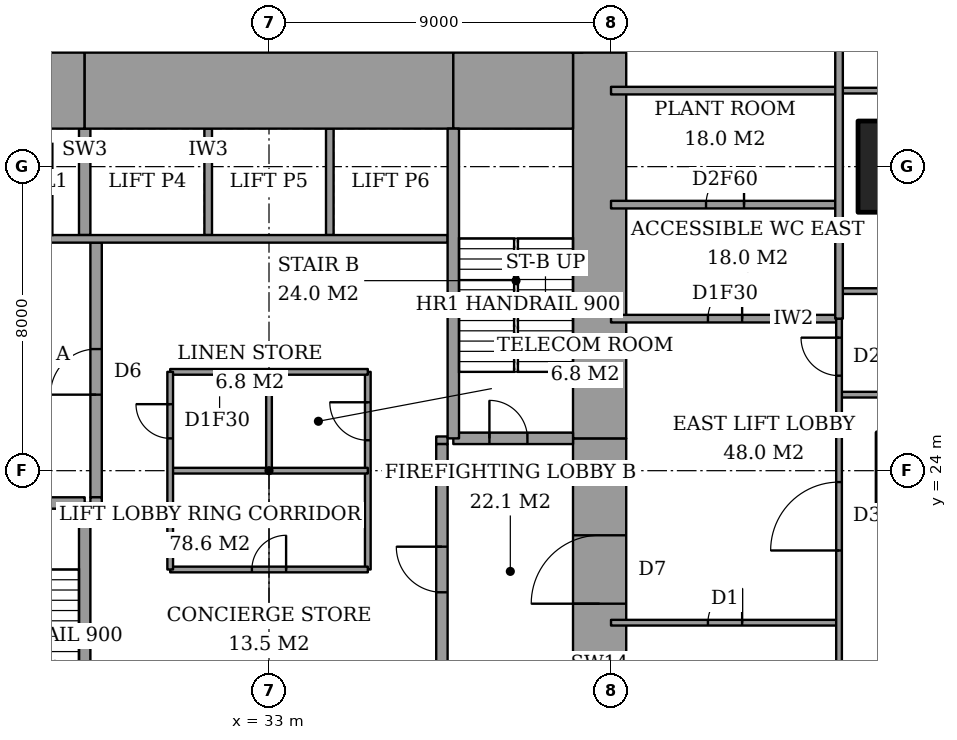
"""IFC4 building model, lengths in metres.
Left out: names, types, materials, properties, quantities, classifications, styles, units other than length and angle.
Written with IfcOpenShell. Run it as: python <this file> out.ifc"""

import sys

from ifc_helpers import new_model, si_unit, direction, frame, frame_2d, origin, origin_2d, place, context, subcontext, project, spatial, rectangle, extrude, element, fill, save


model = new_model("IFC4")
c1 = context("Model", 3, precision=1e-05, world=origin(), true_north=direction((0.0, 1.0)))
c2 = subcontext(c1, "Body", "Model", "MODEL_VIEW")
j1 = project(units=[si_unit("LENGTHUNIT", "METRE"), si_unit("PLANEANGLEUNIT", "RADIAN")], contexts=[c1])
p1 = place(None, origin())
s1 = spatial("IfcSite", under=j1, at=p1, CompositionType="ELEMENT")
p2 = place(p1, origin())
s2 = spatial("IfcBuilding", under=s1, at=p2, CompositionType="ELEMENT")
p3 = place(p2, frame((0.0, 0.0, 16.0)))
s3 = spatial("IfcBuildingStorey", under=s2, at=p3, CompositionType="ELEMENT", Elevation=16.0)
p4 = place(p3, frame((50.0, 32.0, 0.0), z_axis=(0.0, 0.0, 1.0), x_axis=(1.0, 0.0, 0.0)))
e1 = element("IfcColumn", 1, at=p4, inside=s3, PredefinedType="COLUMN", context=c2, shape_type="SweptSolid", body=[
    extrude(rectangle(XDim=3.0, YDim=2.4, at=origin_2d()), origin(), (0.0, 0.0, 1.0), 5.0),
])
p5 = place(p3, frame((25.0, 34.0, 0.0), z_axis=(0.0, 0.0, 1.0), x_axis=(1.0, 0.0, 0.0)))
e2 = element("IfcWall", 2, at=p5, inside=s3, PredefinedType="SHEAR", context=c2, shape_type="SweptSolid", body=[
    extrude(rectangle(XDim=3.15, YDim=2.0, at=frame_2d((1.575, 0.0))), origin(), (0.0, 0.0, 1.0), 5.0),
])
p6 = place(p3, frame((28.15, 34.0, 0.0), z_axis=(0.0, 0.0, 1.0), x_axis=(1.0, 0.0, 0.0)))
e3 = element("IfcWall", 3, at=p6, inside=s3, PredefinedType="SHEAR", context=c2, shape_type="SweptSolid", body=[
    extrude(rectangle(XDim=9.7, YDim=2.0, at=frame_2d((4.85, 0.0))), origin(), (0.0, 0.0, 1.0), 5.0),
])
p7 = place(p3, frame((37.85, 34.0, 0.0), z_axis=(0.0, 0.0, 1.0), x_axis=(1.0, 0.0, 0.0)))
e4 = element("IfcWall", 4, at=p7, inside=s3, PredefinedType="SHEAR", context=c2, shape_type="SweptSolid", body=[
    extrude(rectangle(XDim=3.15, YDim=2.0, at=frame_2d((1.575, 0.0))), origin(), (0.0, 0.0, 1.0), 5.0),
])
p8 = place(p3, frame((41.7, 13.0, 0.0), z_axis=(0.0, 0.0, 1.0), x_axis=(0.0, 1.0, 0.0)))
e5 = element("IfcWall", 5, at=p8, inside=s3, PredefinedType="SHEAR", context=c2, shape_type="SweptSolid", body=[
    extrude(rectangle(XDim=11.85, YDim=1.4, at=frame_2d((5.925, 0.0))), origin(), (0.0, 0.0, 1.0), 5.0),
])
p9 = place(p8, frame((7.5, 0.0, 0.0)))
e6 = element("IfcOpeningElement", 6, at=p9, cuts=e5, PredefinedType="OPENING", context=c2, shape_type="SweptSolid", body=[
    extrude(rectangle(XDim=1.8, YDim=2.4, at=frame_2d((0.9, 1.2))), frame((0.0, 0.71, 0.0), z_axis=(0.0, -1.0, 0.0), x_axis=(1.0, 0.0, 0.0)), (0.0, 0.0, 1.0), 1.42),
])
p10 = place(p3, frame((41.7, 24.85, 0.0), z_axis=(0.0, 0.0, 1.0), x_axis=(0.0, 1.0, 0.0)))
e7 = element("IfcWall", 7, at=p10, inside=s3, PredefinedType="SHEAR", context=c2, shape_type="SweptSolid", body=[
    extrude(rectangle(XDim=10.15, YDim=1.4, at=frame_2d((5.075, 0.0))), origin(), (0.0, 0.0, 1.0), 5.0),
])
p11 = place(p3, frame((28.15, 15.0, 0.0), z_axis=(0.0, 0.0, 1.0), x_axis=(0.0, 1.0, 0.0)))
e8 = element("IfcWall", 8, at=p11, inside=s3, PredefinedType="SHEAR", context=c2, shape_type="SweptSolid", body=[
    extrude(rectangle(XDim=8.15, YDim=0.3, at=frame_2d((4.075, 0.0))), origin(), (0.0, 0.0, 1.0), 5.0),
])
p12 = place(p3, frame((25.0, 23.15, 0.0), z_axis=(0.0, 0.0, 1.0), x_axis=(1.0, 0.0, 0.0)))
e9 = element("IfcWall", 9, at=p12, inside=s3, PredefinedType="SHEAR", context=c2, shape_type="SweptSolid", body=[
    extrude(rectangle(XDim=3.15, YDim=0.3, at=frame_2d((1.575, 0.0))), origin(), (0.0, 0.0, 1.0), 5.0),
])
p13 = place(p12, frame((0.6, 0.0, 0.0)))
e10 = element("IfcOpeningElement", 10, at=p13, cuts=e9, PredefinedType="OPENING", context=c2, shape_type="SweptSolid", body=[
    extrude(rectangle(XDim=1.0, YDim=2.1, at=frame_2d((0.5, 1.05))), frame((0.0, 0.16, 0.0), z_axis=(0.0, -1.0, 0.0), x_axis=(1.0, 0.0, 0.0)), (0.0, 0.0, 1.0), 0.32),
])
p14 = place(p3, frame((37.85, 24.85, 0.0), z_axis=(0.0, 0.0, 1.0), x_axis=(0.0, 1.0, 0.0)))
e11 = element("IfcWall", 11, at=p14, inside=s3, PredefinedType="SHEAR", context=c2, shape_type="SweptSolid", body=[
    extrude(rectangle(XDim=8.15, YDim=0.3, at=frame_2d((4.075, 0.0))), origin(), (0.0, 0.0, 1.0), 5.0),
])
p15 = place(p3, frame((37.85, 24.85, 0.0), z_axis=(0.0, 0.0, 1.0), x_axis=(1.0, 0.0, 0.0)))
e12 = element("IfcWall", 12, at=p15, inside=s3, PredefinedType="SHEAR", context=c2, shape_type="SweptSolid", body=[
    extrude(rectangle(XDim=3.15, YDim=0.3, at=frame_2d((1.575, 0.0))), origin(), (0.0, 0.0, 1.0), 5.0),
])
p16 = place(p15, frame((0.95, 0.0, 0.0)))
e13 = element("IfcOpeningElement", 13, at=p16, cuts=e12, PredefinedType="OPENING", context=c2, shape_type="SweptSolid", body=[
    extrude(rectangle(XDim=1.0, YDim=2.1, at=frame_2d((0.5, 1.05))), frame((0.0, 0.16, 0.0), z_axis=(0.0, -1.0, 0.0), x_axis=(1.0, 0.0, 0.0)), (0.0, 0.0, 1.0), 0.32),
])
p17 = place(p3, frame((28.45, 23.3, 0.0), z_axis=(0.0, 0.0, 1.0), x_axis=(0.0, 1.0, 0.0)))
e14 = element("IfcWall", 14, at=p17, inside=s3, PredefinedType="PARTITIONING", context=c2, shape_type="SweptSolid", body=[
    extrude(rectangle(XDim=6.7, YDim=0.3, at=frame_2d((3.35, 0.0))), origin(), (0.0, 0.0, 1.0), 5.0),
])
p18 = place(p17, frame((2.7, 0.0, 0.0)))
e15 = element("IfcOpeningElement", 15, at=p18, cuts=e14, PredefinedType="OPENING", context=c2, shape_type="SweptSolid", body=[
    extrude(rectangle(XDim=1.2, YDim=2.1, at=frame_2d((0.6, 1.05))), frame((0.0, 0.16, 0.0), z_axis=(0.0, -1.0, 0.0), x_axis=(1.0, 0.0, 0.0)), (0.0, 0.0, 1.0), 0.32),
])
p19 = place(p3, frame((37.55, 18.0, 0.0), z_axis=(0.0, 0.0, 1.0), x_axis=(0.0, 1.0, 0.0)))
e16 = element("IfcWall", 16, at=p19, inside=s3, PredefinedType="PARTITIONING", context=c2, shape_type="SweptSolid", body=[
    extrude(rectangle(XDim=6.7, YDim=0.3, at=frame_2d((3.35, 0.0))), origin(), (0.0, 0.0, 1.0), 5.0),
])
p20 = place(p19, frame((2.8, 0.0, 0.0)))
e17 = element("IfcOpeningElement", 17, at=p20, cuts=e16, PredefinedType="OPENING", context=c2, shape_type="SweptSolid", body=[
    extrude(rectangle(XDim=1.2, YDim=2.1, at=frame_2d((0.6, 1.05))), frame((0.0, 0.16, 0.0), z_axis=(0.0, -1.0, 0.0), x_axis=(1.0, 0.0, 0.0)), (0.0, 0.0, 1.0), 0.32),
])
p21 = place(p3, frame((42.0, 20.0, 0.0), z_axis=(0.0, 0.0, 1.0), x_axis=(1.0, 0.0, 0.0)))
e18 = element("IfcWall", 18, at=p21, inside=s3, PredefinedType="PARTITIONING", context=c2, shape_type="SweptSolid", body=[
    extrude(rectangle(XDim=6.0, YDim=0.15, at=frame_2d((3.0, 0.0))), origin(), (0.0, 0.0, 1.0), 4.7),
])
p22 = place(p21, frame((2.55, 0.0, 0.0)))
e19 = element("IfcOpeningElement", 19, at=p22, cuts=e18, PredefinedType="OPENING", context=c2, shape_type="SweptSolid", body=[
    extrude(rectangle(XDim=0.9, YDim=2.1, at=frame_2d((0.45, 1.05))), frame((0.0, 0.085, 0.0), z_axis=(0.0, -1.0, 0.0), x_axis=(1.0, 0.0, 0.0)), (0.0, 0.0, 1.0), 0.17),
])
p23 = place(p3, frame((48.0, 26.0, 0.0), z_axis=(0.0, 0.0, 1.0), x_axis=(1.0, 0.0, 0.0)))
e20 = element("IfcWall", 20, at=p23, inside=s3, PredefinedType="PARTITIONING", context=c2, shape_type="SweptSolid", body=[
    extrude(rectangle(XDim=11.275, YDim=0.15, at=frame_2d((5.637, 0.0))), origin(), (0.0, 0.0, 1.0), 4.7),
])
p24 = place(p3, frame((42.0, 28.0, 0.0), z_axis=(0.0, 0.0, 1.0), x_axis=(1.0, 0.0, 0.0)))
e21 = element("IfcWall", 21, at=p24, inside=s3, PredefinedType="PARTITIONING", context=c2, shape_type="SweptSolid", body=[
    extrude(rectangle(XDim=6.0, YDim=0.2, at=frame_2d((3.0, 0.0))), origin(), (0.0, 0.0, 1.0), 4.7),
])
p25 = place(p24, frame((2.55, 0.0, 0.0)))
e22 = element("IfcOpeningElement", 22, at=p25, cuts=e21, PredefinedType="OPENING", context=c2, shape_type="SweptSolid", body=[
    extrude(rectangle(XDim=0.9, YDim=2.1, at=frame_2d((0.45, 1.05))), frame((0.0, 0.11, 0.0), z_axis=(0.0, -1.0, 0.0), x_axis=(1.0, 0.0, 0.0)), (0.0, 0.0, 1.0), 0.22),
])
p26 = place(p3, frame((48.0, 28.725, 0.0), z_axis=(0.0, 0.0, 1.0), x_axis=(1.0, 0.0, 0.0)))
e23 = element("IfcWall", 23, at=p26, inside=s3, PredefinedType="PARTITIONING", context=c2, shape_type="SweptSolid", body=[
    extrude(rectangle(XDim=11.65, YDim=0.15, at=frame_2d((5.825, 0.0))), origin(), (0.0, 0.0, 1.0), 4.7),
])
p27 = place(p3, frame((42.0, 31.0, 0.0), z_axis=(0.0, 0.0, 1.0), x_axis=(1.0, 0.0, 0.0)))
e24 = element("IfcWall", 24, at=p27, inside=s3, PredefinedType="PARTITIONING", context=c2, shape_type="SweptSolid", body=[
    extrude(rectangle(XDim=6.0, YDim=0.2, at=frame_2d((3.0, 0.0))), origin(), (0.0, 0.0, 1.0), 4.7),
])
p28 = place(p27, frame((2.5, 0.0, 0.0)))
e25 = element("IfcOpeningElement", 25, at=p28, cuts=e24, PredefinedType="OPENING", context=c2, shape_type="SweptSolid", body=[
    extrude(rectangle(XDim=1.0, YDim=2.1, at=frame_2d((0.5, 1.05))), frame((0.0, 0.11, 0.0), z_axis=(0.0, -1.0, 0.0), x_axis=(1.0, 0.0, 0.0)), (0.0, 0.0, 1.0), 0.22),
])
p29 = place(p3, frame((42.0, 34.0, 0.0), z_axis=(0.0, 0.0, 1.0), x_axis=(1.0, 0.0, 0.0)))
e26 = element("IfcWall", 26, at=p29, inside=s3, PredefinedType="PARTITIONING", context=c2, shape_type="SweptSolid", body=[
    extrude(rectangle(XDim=6.0, YDim=0.2, at=frame_2d((3.0, 0.0))), origin(), (0.0, 0.0, 1.0), 4.7),
])
p30 = place(p3, frame((48.0, 34.0, 0.0), z_axis=(0.0, 0.0, 1.0), x_axis=(1.0, 0.0, 0.0)))
e27 = element("IfcWall", 27, at=p30, inside=s3, PredefinedType="PARTITIONING", context=c2, shape_type="SweptSolid", body=[
    extrude(rectangle(XDim=18.45, YDim=0.15, at=frame_2d((9.225, 0.0))), origin(), (0.0, 0.0, 1.0), 4.7),
])
p31 = place(p30, frame((6.625, 0.0, 0.0)))
e28 = element("IfcOpeningElement", 28, at=p31, cuts=e27, PredefinedType="OPENING", context=c2, shape_type="SweptSolid", body=[
    extrude(rectangle(XDim=1.8, YDim=2.1, at=frame_2d((0.9, 1.05))), frame((0.0, 0.085, 0.0), z_axis=(0.0, -1.0, 0.0), x_axis=(1.0, 0.0, 0.0)), (0.0, 0.0, 1.0), 0.17),
])
p32 = place(p3, frame((48.0, 28.0, 0.0), z_axis=(0.0, 0.0, 1.0), x_axis=(0.0, 1.0, 0.0)))
e29 = element("IfcWall", 29, at=p32, inside=s3, PredefinedType="PARTITIONING", context=c2, shape_type="SweptSolid", body=[
    extrude(rectangle(XDim=20.561, YDim=0.2, at=frame_2d((10.281, 0.0))), origin(), (0.0, 0.0, 1.0), 4.7),
])
p33 = place(p3, frame((48.0, 14.0, 0.0), z_axis=(0.0, 0.0, 1.0), x_axis=(0.0, 1.0, 0.0)))
e30 = element("IfcWall", 30, at=p33, inside=s3, PredefinedType="PARTITIONING", context=c2, shape_type="SweptSolid", body=[
    extrude(rectangle(XDim=14.0, YDim=0.15, at=frame_2d((7.0, 0.0))), origin(), (0.0, 0.0, 1.0), 4.7),
])
p34 = place(p33, frame((12.5, 0.0, 0.0)))
e31 = element("IfcOpeningElement", 31, at=p34, cuts=e30, PredefinedType="OPENING", context=c2, shape_type="SweptSolid", body=[
    extrude(rectangle(XDim=1.0, YDim=2.1, at=frame_2d((0.5, 1.05))), frame((0.0, 0.085, 0.0), z_axis=(0.0, -1.0, 0.0), x_axis=(1.0, 0.0, 0.0)), (0.0, 0.0, 1.0), 0.17),
])
p35 = place(p33, frame((7.9, 0.0, 0.0)))
e32 = element("IfcOpeningElement", 32, at=p35, cuts=e30, PredefinedType="OPENING", context=c2, shape_type="SweptSolid", body=[
    extrude(rectangle(XDim=1.8, YDim=2.1, at=frame_2d((0.9, 1.05))), frame((0.0, 0.085, 0.0), z_axis=(0.0, -1.0, 0.0), x_axis=(1.0, 0.0, 0.0)), (0.0, 0.0, 1.0), 0.17),
])
p36 = place(p3, frame((25.0, 30.1, 0.0), z_axis=(0.0, 0.0, 1.0), x_axis=(1.0, 0.0, 0.0)))
e33 = element("IfcWall", 33, at=p36, inside=s3, PredefinedType="PARTITIONING", context=c2, shape_type="SweptSolid", body=[
    extrude(rectangle(XDim=12.7, YDim=0.2, at=frame_2d((6.35, 0.0))), origin(), (0.0, 0.0, 1.0), 5.0),
])
p37 = place(p36, frame((0.9, 0.0, 0.0)))
e34 = element("IfcOpeningElement", 34, at=p37, cuts=e33, PredefinedType="OPENING", context=c2, shape_type="SweptSolid", body=[
    extrude(rectangle(XDim=1.2, YDim=2.1, at=frame_2d((0.6, 1.05))), frame((0.0, 0.11, 0.0), z_axis=(0.0, -1.0, 0.0), x_axis=(1.0, 0.0, 0.0)), (0.0, 0.0, 1.0), 0.22),
])
for number, where, z_axis, x_axis in (
    (35, (31.4, 30.2, 0.0), (0.0, 0.0, 1.0), (0.0, 1.0, 0.0)),
    (36, (34.6, 30.2, 0.0), (0.0, 0.0, 1.0), (0.0, 1.0, 0.0)),
):
    element("IfcWall", number, at=place(p3, frame(where, z_axis=z_axis, x_axis=x_axis)), inside=s3, PredefinedType="PARTITIONING", context=c2, shape_type="SweptSolid", body=[
        extrude(rectangle(XDim=2.8, YDim=0.2, at=frame_2d((1.4, 0.0))), origin(), (0.0, 0.0, 1.0), 5.0),
    ])
p38 = place(p3, frame((28.15, 30.2, 0.0), z_axis=(0.0, 0.0, 1.0), x_axis=(0.0, 1.0, 0.0)))
e37 = element("IfcWall", 37, at=p38, inside=s3, PredefinedType="SHEAR", context=c2, shape_type="SweptSolid", body=[
    extrude(rectangle(XDim=2.8, YDim=0.3, at=frame_2d((1.4, 0.0))), origin(), (0.0, 0.0, 1.0), 5.0),
])
for number, where, z_axis, x_axis in (
    (38, (28.3, 23.2, 0.0), (0.0, 0.0, 1.0), (1.0, 0.0, 0.0)),
    (39, (37.4, 24.8, 0.0), (0.0, 0.0, 1.0), (1.0, 0.0, 0.0)),
):
    element("IfcWall", number, at=place(p3, frame(where, z_axis=z_axis, x_axis=x_axis)), inside=s3, PredefinedType="PARTITIONING", context=c2, shape_type="SweptSolid", body=[
        extrude(rectangle(XDim=0.3, YDim=0.2, at=frame_2d((0.15, 0.0))), origin(), (0.0, 0.0, 1.0), 5.0),
    ])
p39 = place(p3, frame((30.4, 21.4, 0.0), z_axis=(0.0, 0.0, 1.0), x_axis=(1.0, 0.0, 0.0)))
e40 = element("IfcWall", 40, at=p39, inside=s3, PredefinedType="PARTITIONING", context=c2, shape_type="SweptSolid", body=[
    extrude(rectangle(XDim=5.2, YDim=0.15, at=frame_2d((2.6, 0.0))), origin(), (0.0, 0.0, 1.0), 4.7),
])
p40 = place(p39, frame((2.15, 0.0, 0.0)))
e41 = element("IfcOpeningElement", 41, at=p40, cuts=e40, PredefinedType="OPENING", context=c2, shape_type="SweptSolid", body=[
    extrude(rectangle(XDim=0.9, YDim=2.1, at=frame_2d((0.45, 1.05))), frame((0.0, 0.085, 0.0), z_axis=(0.0, -1.0, 0.0), x_axis=(1.0, 0.0, 0.0)), (0.0, 0.0, 1.0), 0.17),
])
p41 = place(p3, frame((30.4, 26.6, 0.0), z_axis=(0.0, 0.0, 1.0), x_axis=(1.0, 0.0, 0.0)))
e42 = element("IfcWall", 42, at=p41, inside=s3, PredefinedType="PARTITIONING", context=c2, shape_type="SweptSolid", body=[
    extrude(rectangle(XDim=5.2, YDim=0.15, at=frame_2d((2.6, 0.0))), origin(), (0.0, 0.0, 1.0), 4.7),
])
p42 = place(p3, frame((30.4, 21.4, 0.0), z_axis=(0.0, 0.0, 1.0), x_axis=(0.0, 1.0, 0.0)))
e43 = element("IfcWall", 43, at=p42, inside=s3, PredefinedType="PARTITIONING", context=c2, shape_type="SweptSolid", body=[
    extrude(rectangle(XDim=5.2, YDim=0.15, at=frame_2d((2.6, 0.0))), origin(), (0.0, 0.0, 1.0), 4.7),
])
p43 = place(p42, frame((3.45, 0.0, 0.0)))
e44 = element("IfcOpeningElement", 44, at=p43, cuts=e43, PredefinedType="OPENING", context=c2, shape_type="SweptSolid", body=[
    extrude(rectangle(XDim=0.9, YDim=2.1, at=frame_2d((0.45, 1.05))), frame((0.0, 0.085, 0.0), z_axis=(0.0, -1.0, 0.0), x_axis=(1.0, 0.0, 0.0)), (0.0, 0.0, 1.0), 0.17),
])
p44 = place(p3, frame((35.6, 21.4, 0.0), z_axis=(0.0, 0.0, 1.0), x_axis=(0.0, 1.0, 0.0)))
e45 = element("IfcWall", 45, at=p44, inside=s3, PredefinedType="PARTITIONING", context=c2, shape_type="SweptSolid", body=[
    extrude(rectangle(XDim=5.2, YDim=0.15, at=frame_2d((2.6, 0.0))), origin(), (0.0, 0.0, 1.0), 4.7),
])
p45 = place(p44, frame((3.4, 0.0, 0.0)))
e46 = element("IfcOpeningElement", 46, at=p45, cuts=e45, PredefinedType="OPENING", context=c2, shape_type="SweptSolid", body=[
    extrude(rectangle(XDim=1.0, YDim=2.1, at=frame_2d((0.5, 1.05))), frame((0.0, 0.085, 0.0), z_axis=(0.0, -1.0, 0.0), x_axis=(1.0, 0.0, 0.0)), (0.0, 0.0, 1.0), 0.17),
])
p46 = place(p3, frame((30.4, 24.0, 0.0), z_axis=(0.0, 0.0, 1.0), x_axis=(1.0, 0.0, 0.0)))
e47 = element("IfcWall", 47, at=p46, inside=s3, PredefinedType="PARTITIONING", context=c2, shape_type="SweptSolid", body=[
    extrude(rectangle(XDim=5.2, YDim=0.15, at=frame_2d((2.6, 0.0))), origin(), (0.0, 0.0, 1.0), 4.7),
])
p47 = place(p3, frame((33.0, 24.0, 0.0), z_axis=(0.0, 0.0, 1.0), x_axis=(0.0, 1.0, 0.0)))
e48 = element("IfcWall", 48, at=p47, inside=s3, PredefinedType="PARTITIONING", context=c2, shape_type="SweptSolid", body=[
    extrude(rectangle(XDim=2.6, YDim=0.15, at=frame_2d((1.3, 0.0))), origin(), (0.0, 0.0, 1.0), 4.7),
])
p48 = place(p34, origin())
e49 = element("IfcDoor", 49, at=p48, inside=s3, OperationType="SINGLE_SWING_LEFT", PredefinedType="DOOR", context=c2, shape_type="SweptSolid", body=[
    extrude(rectangle(XDim=1.0, YDim=2.1, at=frame_2d((0.5, 1.05))), frame((0.0, 0.025, 0.0), z_axis=(0.0, -1.0, 0.0), x_axis=(1.0, 0.0, 0.0)), (0.0, 0.0, 1.0), 0.05),
])
fill(e31, e49)
p49 = place(p35, origin())
e50 = element("IfcDoor", 50, at=p49, inside=s3, OperationType="DOUBLE_DOOR_DOUBLE_SWING", PredefinedType="DOOR", context=c2, shape_type="SweptSolid", body=[
    extrude(rectangle(XDim=1.8, YDim=2.1, at=frame_2d((0.9, 1.05))), frame((0.0, 0.025, 0.0), z_axis=(0.0, -1.0, 0.0), x_axis=(1.0, 0.0, 0.0)), (0.0, 0.0, 1.0), 0.05),
])
fill(e32, e50)
p50 = place(p25, origin())
e51 = element("IfcDoor", 51, at=p50, inside=s3, OperationType="SINGLE_SWING_LEFT", PredefinedType="DOOR", context=c2, shape_type="SweptSolid", body=[
    extrude(rectangle(XDim=0.9, YDim=2.1, at=frame_2d((0.45, 1.05))), frame((0.0, 0.025, 0.0), z_axis=(0.0, -1.0, 0.0), x_axis=(1.0, 0.0, 0.0)), (0.0, 0.0, 1.0), 0.05),
])
fill(e22, e51)
p51 = place(p22, origin())
e52 = element("IfcDoor", 52, at=p51, inside=s3, OperationType="SINGLE_SWING_LEFT", PredefinedType="DOOR", context=c2, shape_type="SweptSolid", body=[
    extrude(rectangle(XDim=0.9, YDim=2.1, at=frame_2d((0.45, 1.05))), frame((0.0, 0.025, 0.0), z_axis=(0.0, -1.0, 0.0), x_axis=(1.0, 0.0, 0.0)), (0.0, 0.0, 1.0), 0.05),
])
fill(e19, e52)
p52 = place(p28, origin())
e53 = element("IfcDoor", 53, at=p52, inside=s3, OperationType="SINGLE_SWING_LEFT", PredefinedType="DOOR", context=c2, shape_type="SweptSolid", body=[
    extrude(rectangle(XDim=1.0, YDim=2.1, at=frame_2d((0.5, 1.05))), frame((0.0, 0.025, 0.0), z_axis=(0.0, -1.0, 0.0), x_axis=(1.0, 0.0, 0.0)), (0.0, 0.0, 1.0), 0.05),
])
fill(e25, e53)
p53 = place(p16, origin())
e54 = element("IfcDoor", 54, at=p53, inside=s3, OperationType="SINGLE_SWING_RIGHT", PredefinedType="DOOR", context=c2, shape_type="SweptSolid", body=[
    extrude(rectangle(XDim=1.0, YDim=2.1, at=frame_2d((0.5, 1.05))), frame((0.0, 0.025, 0.0), z_axis=(0.0, -1.0, 0.0), x_axis=(1.0, 0.0, 0.0)), (0.0, 0.0, 1.0), 0.05),
])
fill(e13, e54)
p54 = place(p18, origin())
e55 = element("IfcDoor", 55, at=p54, inside=s3, OperationType="SINGLE_SWING_RIGHT", PredefinedType="DOOR", context=c2, shape_type="SweptSolid", body=[
    extrude(rectangle(XDim=1.2, YDim=2.1, at=frame_2d((0.6, 1.05))), frame((0.0, 0.025, 0.0), z_axis=(0.0, -1.0, 0.0), x_axis=(1.0, 0.0, 0.0)), (0.0, 0.0, 1.0), 0.05),
])
fill(e15, e55)
p55 = place(p20, origin())
e56 = element("IfcDoor", 56, at=p55, inside=s3, OperationType="SINGLE_SWING_LEFT", PredefinedType="DOOR", context=c2, shape_type="SweptSolid", body=[
    extrude(rectangle(XDim=1.2, YDim=2.1, at=frame_2d((0.6, 1.05))), frame((0.0, 0.025, 0.0), z_axis=(0.0, -1.0, 0.0), x_axis=(1.0, 0.0, 0.0)), (0.0, 0.0, 1.0), 0.05),
])
fill(e17, e56)
p56 = place(p9, origin())
e57 = element("IfcDoor", 57, at=p56, inside=s3, OperationType="DOUBLE_DOOR_DOUBLE_SWING", PredefinedType="DOOR", context=c2, shape_type="SweptSolid", body=[
    extrude(rectangle(XDim=1.8, YDim=2.4, at=frame_2d((0.9, 1.2))), frame((0.0, 0.025, 0.0), z_axis=(0.0, -1.0, 0.0), x_axis=(1.0, 0.0, 0.0)), (0.0, 0.0, 1.0), 0.05),
])
fill(e6, e57)
p57 = place(p40, origin())
e58 = element("IfcDoor", 58, at=p57, inside=s3, OperationType="SINGLE_SWING_LEFT", PredefinedType="DOOR", context=c2, shape_type="SweptSolid", body=[
    extrude(rectangle(XDim=0.9, YDim=2.1, at=frame_2d((0.45, 1.05))), frame((0.0, 0.025, 0.0), z_axis=(0.0, -1.0, 0.0), x_axis=(1.0, 0.0, 0.0)), (0.0, 0.0, 1.0), 0.05),
])
fill(e41, e58)
p58 = place(p43, origin())
e59 = element("IfcDoor", 59, at=p58, inside=s3, OperationType="SINGLE_SWING_LEFT", PredefinedType="DOOR", context=c2, shape_type="SweptSolid", body=[
    extrude(rectangle(XDim=0.9, YDim=2.1, at=frame_2d((0.45, 1.05))), frame((0.0, 0.025, 0.0), z_axis=(0.0, -1.0, 0.0), x_axis=(1.0, 0.0, 0.0)), (0.0, 0.0, 1.0), 0.05),
])
fill(e44, e59)
p59 = place(p45, origin())
e60 = element("IfcDoor", 60, at=p59, inside=s3, OperationType="SINGLE_SWING_LEFT", PredefinedType="DOOR", context=c2, shape_type="SweptSolid", body=[
    extrude(rectangle(XDim=1.0, YDim=2.1, at=frame_2d((0.5, 1.05))), frame((0.0, 0.025, 0.0), z_axis=(0.0, -1.0, 0.0), x_axis=(1.0, 0.0, 0.0)), (0.0, 0.0, 1.0), 0.05),
])
fill(e46, e60)
save(model, sys.argv[1])
